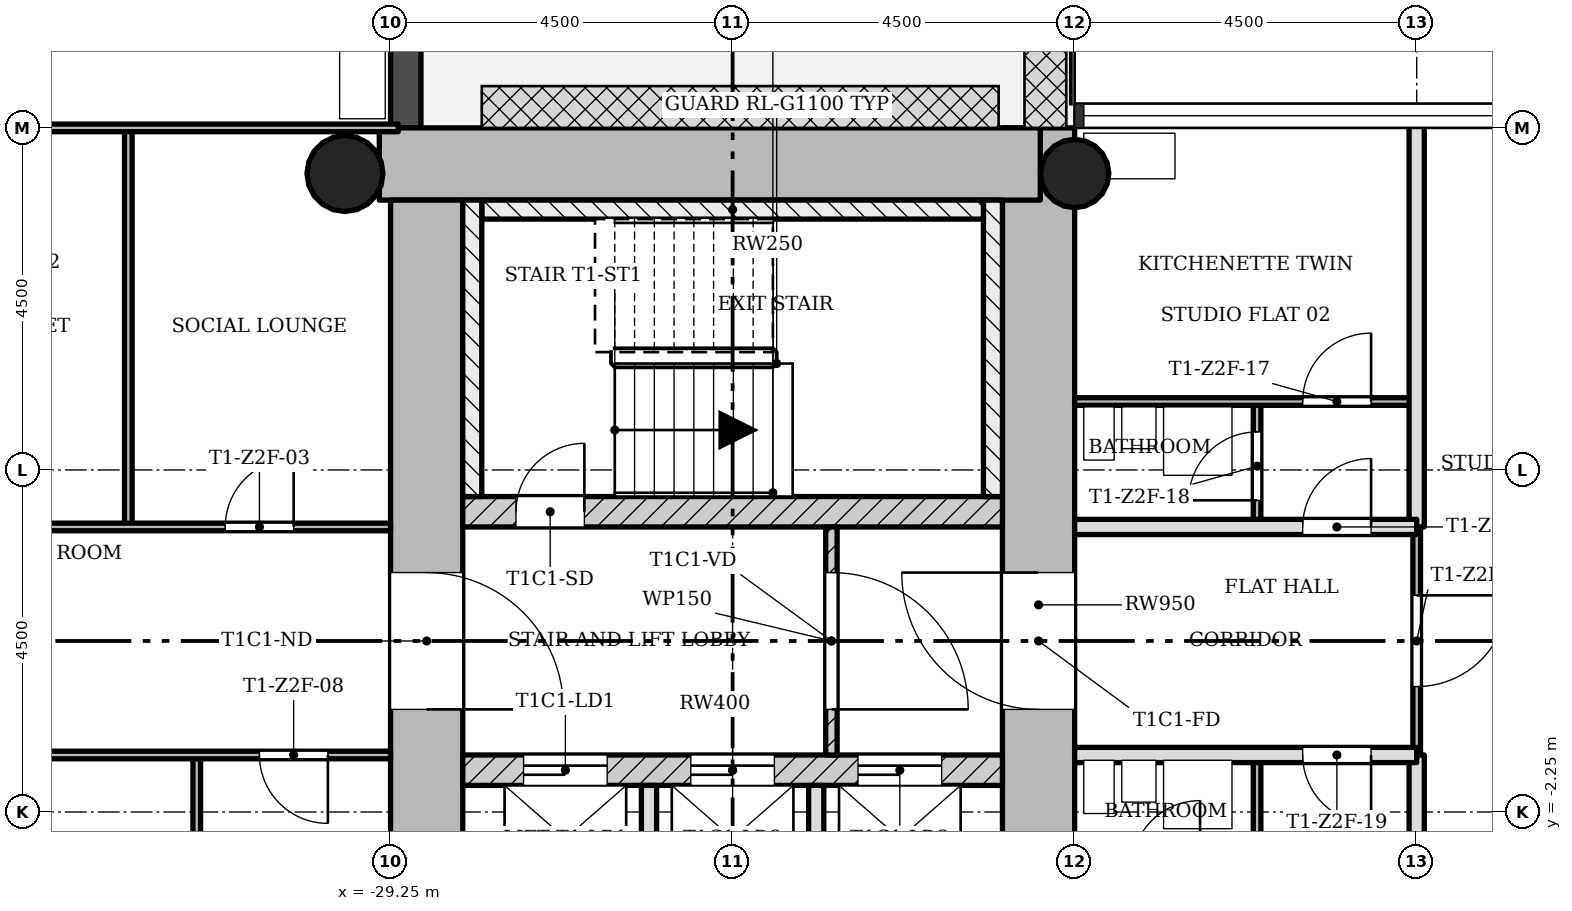
"""IFC4 building model, lengths in metres.
Left out: names, types, materials, properties, quantities, classifications, styles, units other than length and angle.
Written with IfcOpenShell. Run it as: python <this file> out.ifc"""

import sys

from ifc_helpers import new_model, si_unit, direction, frame, frame_2d, origin, origin_2d, place, context, subcontext, project, spatial, rectangle, hollow_circle, extrude, element, fill, save


model = new_model("IFC4")
c1 = context("Model", 3, precision=1e-05, world=origin(), true_north=direction((0.0, 1.0)))
c2 = subcontext(c1, "Body", "Model", "MODEL_VIEW")
j1 = project(units=[si_unit("LENGTHUNIT", "METRE"), si_unit("PLANEANGLEUNIT", "RADIAN")], contexts=[c1])
p1 = place(None, origin())
s1 = spatial("IfcSite", under=j1, at=p1, CompositionType="ELEMENT")
p2 = place(p1, origin())
s2 = spatial("IfcBuilding", under=s1, at=p2, CompositionType="ELEMENT")
p3 = place(p2, frame((0.0, 0.0, 110.6)))
s3 = spatial("IfcBuildingStorey", under=s2, at=p3, CompositionType="ELEMENT", Elevation=110.6)
p4 = place(p3, frame((-20.725, -5.8, 0.0), z_axis=(0.0, 0.0, 1.0), x_axis=(0.0, 1.0, 0.0)))
e1 = element("IfcWall", 1, at=p4, inside=s3, PredefinedType="SHEAR", context=c2, shape_type="SweptSolid", body=[
    extrude(rectangle(XDim=12.55, YDim=0.95, at=frame_2d((6.275, 0.0))), origin(), (0.0, 0.0, 1.0), 3.4),
])
p5 = place(p4, frame((4.9, 0.0, 0.0)))
e2 = element("IfcOpeningElement", 2, at=p5, cuts=e1, PredefinedType="OPENING", context=c2, shape_type="SweptSolid", body=[
    extrude(rectangle(XDim=1.8, YDim=2.1, at=frame_2d((0.9, 1.05))), frame((0.0, 0.485, 0.0), z_axis=(0.0, -1.0, 0.0), x_axis=(1.0, 0.0, 0.0)), (0.0, 0.0, 1.0), 0.97),
])
p6 = place(p3, frame((-20.702, 6.275, 0.0), z_axis=(0.0, 0.0, 1.0), x_axis=(-1.0, 0.0, 0.0)))
e3 = element("IfcWall", 3, at=p6, inside=s3, PredefinedType="SHEAR", context=c2, shape_type="SweptSolid", body=[
    extrude(rectangle(XDim=8.696, YDim=0.95, at=frame_2d((4.348, 0.0))), origin(), (0.0, 0.0, 1.0), 3.4),
])
p7 = place(p3, frame((-28.775, 5.8, 0.0), z_axis=(0.0, 0.0, 1.0), x_axis=(0.0, -1.0, 0.0)))
e4 = element("IfcWall", 4, at=p7, inside=s3, PredefinedType="SHEAR", context=c2, shape_type="SweptSolid", body=[
    extrude(rectangle(XDim=12.55, YDim=0.95, at=frame_2d((6.275, 0.0))), origin(), (0.0, 0.0, 1.0), 3.4),
])
p8 = place(p7, frame((4.9, 0.0, 0.0)))
e5 = element("IfcOpeningElement", 5, at=p8, cuts=e4, PredefinedType="OPENING", context=c2, shape_type="SweptSolid", body=[
    extrude(rectangle(XDim=1.8, YDim=2.1, at=frame_2d((0.9, 1.05))), frame((0.0, 0.485, 0.0), z_axis=(0.0, -1.0, 0.0), x_axis=(1.0, 0.0, 0.0)), (0.0, 0.0, 1.0), 0.97),
])
p9 = place(p3, frame((-28.3, -1.7, 0.0), z_axis=(0.0, 0.0, 1.0), x_axis=(1.0, 0.0, 0.0)))
e6 = element("IfcWall", 6, at=p9, inside=s3, PredefinedType="SHEAR", context=c2, shape_type="SweptSolid", body=[
    extrude(rectangle(XDim=7.1, YDim=0.4, at=frame_2d((3.55, 0.0))), origin(), (0.0, 0.0, 1.0), 3.4),
])
p10 = place(p9, frame((0.8, 0.0, 0.0)))
e7 = element("IfcOpeningElement", 7, at=p10, cuts=e6, PredefinedType="OPENING", context=c2, shape_type="SweptSolid", body=[
    extrude(rectangle(XDim=1.1, YDim=2.1, at=frame_2d((0.55, 1.05))), frame((0.0, 0.21, 0.0), z_axis=(0.0, -1.0, 0.0), x_axis=(1.0, 0.0, 0.0)), (0.0, 0.0, 1.0), 0.42),
])
p11 = place(p9, frame((3.0, 0.0, 0.0)))
e8 = element("IfcOpeningElement", 8, at=p11, cuts=e6, PredefinedType="OPENING", context=c2, shape_type="SweptSolid", body=[
    extrude(rectangle(XDim=1.1, YDim=2.1, at=frame_2d((0.55, 1.05))), frame((0.0, 0.21, 0.0), z_axis=(0.0, -1.0, 0.0), x_axis=(1.0, 0.0, 0.0)), (0.0, 0.0, 1.0), 0.42),
])
p12 = place(p9, frame((5.2, 0.0, 0.0)))
e9 = element("IfcOpeningElement", 9, at=p12, cuts=e6, PredefinedType="OPENING", context=c2, shape_type="SweptSolid", body=[
    extrude(rectangle(XDim=1.1, YDim=2.1, at=frame_2d((0.55, 1.05))), frame((0.0, 0.21, 0.0), z_axis=(0.0, -1.0, 0.0), x_axis=(1.0, 0.0, 0.0)), (0.0, 0.0, 1.0), 0.42),
])
p13 = place(p3, frame((-28.3, 1.7, 0.0), z_axis=(0.0, 0.0, 1.0), x_axis=(1.0, 0.0, 0.0)))
e10 = element("IfcWall", 10, at=p13, inside=s3, PredefinedType="SHEAR", context=c2, shape_type="SweptSolid", body=[
    extrude(rectangle(XDim=7.1, YDim=0.4, at=frame_2d((3.55, 0.0))), origin(), (0.0, 0.0, 1.0), 3.4),
])
p14 = place(p13, frame((0.7, 0.0, 0.0)))
e11 = element("IfcOpeningElement", 11, at=p14, cuts=e10, PredefinedType="OPENING", context=c2, shape_type="SweptSolid", body=[
    extrude(rectangle(XDim=0.9, YDim=2.1, at=frame_2d((0.45, 1.05))), frame((0.0, 0.21, 0.0), z_axis=(0.0, -1.0, 0.0), x_axis=(1.0, 0.0, 0.0)), (0.0, 0.0, 1.0), 0.42),
])
p15 = place(p3, frame((-20.25, 6.15, 0.0), z_axis=(0.0, 0.0, 1.0), x_axis=(1.0, 0.0, 0.0)))
e12 = element("IfcColumn", 12, at=p15, inside=s3, PredefinedType="COLUMN", context=c2, shape_type="SweptSolid", body=[
    extrude(hollow_circle(Radius=0.45, WallThickness=0.032, at=origin_2d()), origin(), (0.0, 0.0, 1.0), 3.4),
])
p16 = place(p3, frame((-29.85, 6.15, 0.0), z_axis=(0.0, 0.0, 1.0), x_axis=(1.0, 0.0, 0.0)))
e13 = element("IfcColumn", 13, at=p16, inside=s3, PredefinedType="COLUMN", context=c2, shape_type="SweptSolid", body=[
    extrude(hollow_circle(Radius=0.5, WallThickness=0.036, at=origin_2d()), origin(), (0.0, 0.0, 1.0), 3.4),
])
p17 = place(p3, frame((-29.05, 6.75, -0.02), z_axis=(0.0, 0.0, 1.0), x_axis=(0.0, 1.0, 0.0)))
e14 = element("IfcWall", 14, at=p17, inside=s3, PredefinedType="STANDARD", context=c2, shape_type="SweptSolid", body=[
    extrude(rectangle(XDim=4.5, YDim=0.4, at=frame_2d((2.25, 0.0))), origin(), (0.0, 0.0, 1.0), 3.12),
])
p18 = place(p17, frame((1.35, 0.0, 0.02)))
e15 = element("IfcOpeningElement", 15, at=p18, cuts=e14, PredefinedType="OPENING", context=c2, shape_type="SweptSolid", body=[
    extrude(rectangle(XDim=1.8, YDim=2.1, at=frame_2d((0.9, 1.05))), frame((0.0, 0.21, 0.0), z_axis=(0.0, -1.0, 0.0), x_axis=(1.0, 0.0, 0.0)), (0.0, 0.0, 1.0), 0.42),
])
p19 = place(p3, frame((-23.45, -1.5, 0.0), z_axis=(0.0, 0.0, 1.0), x_axis=(0.0, 1.0, 0.0)))
e16 = element("IfcWall", 16, at=p19, inside=s3, PredefinedType="PARTITIONING", context=c2, shape_type="SweptSolid", body=[
    extrude(rectangle(XDim=3.0, YDim=0.15, at=frame_2d((1.5, 0.0))), origin(), (0.0, 0.0, 1.0), 3.0),
])
p20 = place(p19, frame((0.6, 0.0, 0.0)))
e17 = element("IfcOpeningElement", 17, at=p20, cuts=e16, PredefinedType="OPENING", context=c2, shape_type="SweptSolid", body=[
    extrude(rectangle(XDim=1.8, YDim=2.1, at=frame_2d((0.9, 1.05))), frame((0.0, 0.085, 0.0), z_axis=(0.0, -1.0, 0.0), x_axis=(1.0, 0.0, 0.0)), (0.0, 0.0, 1.0), 0.17),
])
for number, where, z_axis, x_axis in (
    (18, (-25.85, -5.8, 0.0), (0.0, 0.0, 1.0), (0.0, 1.0, 0.0)),
    (19, (-23.65, -5.8, 0.0), (0.0, 0.0, 1.0), (0.0, 1.0, 0.0)),
):
    element("IfcWall", number, at=place(p3, frame(where, z_axis=z_axis, x_axis=x_axis)), inside=s3, PredefinedType="SOLIDWALL", context=c2, shape_type="SweptSolid", body=[
        extrude(rectangle(XDim=3.9, YDim=0.2, at=frame_2d((1.95, 0.0))), origin(), (0.0, 0.0, 1.0), 3.0),
    ])
for number, where, z_axis, x_axis in (
    (20, (-32.7, 1.5, 0.0), (0.0, 0.0, 1.0), (0.0, 1.0, 0.0)),
    (21, (-31.8, -6.75, 0.0), (0.0, 0.0, 1.0), (0.0, 1.0, 0.0)),
):
    element("IfcWall", number, at=place(p3, frame(where, z_axis=z_axis, x_axis=x_axis)), inside=s3, PredefinedType="PARTITIONING", context=c2, shape_type="SweptSolid", body=[
        extrude(rectangle(XDim=5.25, YDim=0.1, at=frame_2d((2.625, 0.0))), origin(), (0.0, 0.0, 1.0), 3.0),
    ])
p21 = place(p3, frame((-17.85, -3.0, 0.0), z_axis=(0.0, 0.0, 1.0), x_axis=(0.0, 1.0, 0.0)))
e22 = element("IfcWall", 22, at=p21, inside=s3, PredefinedType="PARTITIONING", context=c2, shape_type="SweptSolid", body=[
    extrude(rectangle(XDim=1.5, YDim=0.1, at=frame_2d((0.75, 0.0))), origin(), (0.0, 0.0, 1.0), 3.0),
])
p22 = place(p3, frame((-17.85, 1.5, 0.0), z_axis=(0.0, 0.0, 1.0), x_axis=(0.0, 1.0, 0.0)))
e23 = element("IfcWall", 23, at=p22, inside=s3, PredefinedType="PARTITIONING", context=c2, shape_type="SweptSolid", body=[
    extrude(rectangle(XDim=1.65, YDim=0.1, at=frame_2d((0.825, 0.0))), origin(), (0.0, 0.0, 1.0), 3.0),
])
p23 = place(p22, frame((0.35, 0.0, 0.0)))
e24 = element("IfcOpeningElement", 24, at=p23, cuts=e23, PredefinedType="OPENING", context=c2, shape_type="SweptSolid", body=[
    extrude(rectangle(XDim=0.9, YDim=2.1, at=frame_2d((0.45, 1.05))), frame((0.0, 0.06, 0.0), z_axis=(0.0, -1.0, 0.0), x_axis=(1.0, 0.0, 0.0)), (0.0, 0.0, 1.0), 0.12),
])
p24 = place(p3, frame((-15.75, -1.5, 0.0), z_axis=(0.0, 0.0, 1.0), x_axis=(0.0, 1.0, 0.0)))
e25 = element("IfcWall", 25, at=p24, inside=s3, PredefinedType="PARTITIONING", context=c2, shape_type="SweptSolid", body=[
    extrude(rectangle(XDim=3.0, YDim=0.1, at=frame_2d((1.5, 0.0))), origin(), (0.0, 0.0, 1.0), 3.0),
])
p25 = place(p24, frame((0.9, 0.0, 0.0)))
e26 = element("IfcOpeningElement", 26, at=p25, cuts=e25, PredefinedType="OPENING", context=c2, shape_type="SweptSolid", body=[
    extrude(rectangle(XDim=1.2, YDim=2.1, at=frame_2d((0.6, 1.05))), frame((0.0, 0.06, 0.0), z_axis=(0.0, -1.0, 0.0), x_axis=(1.0, 0.0, 0.0)), (0.0, 0.0, 1.0), 0.12),
])
for number, where, z_axis, x_axis in (
    (27, (-15.75, -6.85, 0.0), (0.0, 0.0, 1.0), (0.0, 1.0, 0.0)),
    (28, (-15.75, 1.5, 0.0), (0.0, 0.0, 1.0), (0.0, 1.0, 0.0)),
):
    element("IfcWall", number, at=place(p3, frame(where, z_axis=z_axis, x_axis=x_axis)), inside=s3, PredefinedType="SOLIDWALL", context=c2, shape_type="SweptSolid", body=[
        extrude(rectangle(XDim=5.35, YDim=0.2, at=frame_2d((2.675, 0.0))), origin(), (0.0, 0.0, 1.0), 3.0),
    ])
p26 = place(p3, frame((-35.1, -1.5, 0.0), z_axis=(0.0, 0.0, 1.0), x_axis=(1.0, 0.0, 0.0)))
e29 = element("IfcWall", 29, at=p26, inside=s3, PredefinedType="PARTITIONING", context=c2, shape_type="SweptSolid", body=[
    extrude(rectangle(XDim=5.85, YDim=0.1, at=frame_2d((2.925, 0.0))), origin(), (0.0, 0.0, 1.0), 3.0),
])
p27 = place(p26, frame((4.125, 0.0, 0.0)))
e30 = element("IfcOpeningElement", 30, at=p27, cuts=e29, PredefinedType="OPENING", context=c2, shape_type="SweptSolid", body=[
    extrude(rectangle(XDim=0.9, YDim=2.1, at=frame_2d((0.45, 1.05))), frame((0.0, 0.06, 0.0), z_axis=(0.0, -1.0, 0.0), x_axis=(1.0, 0.0, 0.0)), (0.0, 0.0, 1.0), 0.12),
])
p28 = place(p3, frame((-20.25, -1.5, 0.0), z_axis=(0.0, 0.0, 1.0), x_axis=(1.0, 0.0, 0.0)))
e31 = element("IfcWall", 31, at=p28, inside=s3, PredefinedType="SOLIDWALL", context=c2, shape_type="SweptSolid", body=[
    extrude(rectangle(XDim=4.5, YDim=0.2, at=frame_2d((2.25, 0.0))), origin(), (0.0, 0.0, 1.0), 3.0),
])
p29 = place(p28, frame((3.0, 0.0, 0.0)))
e32 = element("IfcOpeningElement", 32, at=p29, cuts=e31, PredefinedType="OPENING", context=c2, shape_type="SweptSolid", body=[
    extrude(rectangle(XDim=0.9, YDim=2.1, at=frame_2d((0.45, 1.05))), frame((0.0, 0.11, 0.0), z_axis=(0.0, -1.0, 0.0), x_axis=(1.0, 0.0, 0.0)), (0.0, 0.0, 1.0), 0.22),
])
p30 = place(p3, frame((-35.1, 1.5, 0.0), z_axis=(0.0, 0.0, 1.0), x_axis=(1.0, 0.0, 0.0)))
e33 = element("IfcWall", 33, at=p30, inside=s3, PredefinedType="PARTITIONING", context=c2, shape_type="SweptSolid", body=[
    extrude(rectangle(XDim=5.85, YDim=0.1, at=frame_2d((2.925, 0.0))), origin(), (0.0, 0.0, 1.0), 3.0),
])
p31 = place(p30, frame((3.675, 0.0, 0.0)))
e34 = element("IfcOpeningElement", 34, at=p31, cuts=e33, PredefinedType="OPENING", context=c2, shape_type="SweptSolid", body=[
    extrude(rectangle(XDim=0.9, YDim=2.1, at=frame_2d((0.45, 1.05))), frame((0.0, 0.06, 0.0), z_axis=(0.0, -1.0, 0.0), x_axis=(1.0, 0.0, 0.0)), (0.0, 0.0, 1.0), 0.12),
])
p32 = place(p3, frame((-20.25, 1.5, 0.0), z_axis=(0.0, 0.0, 1.0), x_axis=(1.0, 0.0, 0.0)))
e35 = element("IfcWall", 35, at=p32, inside=s3, PredefinedType="SOLIDWALL", context=c2, shape_type="SweptSolid", body=[
    extrude(rectangle(XDim=4.5, YDim=0.2, at=frame_2d((2.25, 0.0))), origin(), (0.0, 0.0, 1.0), 3.0),
])
p33 = place(p32, frame((3.0, 0.0, 0.0)))
e36 = element("IfcOpeningElement", 36, at=p33, cuts=e35, PredefinedType="OPENING", context=c2, shape_type="SweptSolid", body=[
    extrude(rectangle(XDim=0.9, YDim=2.1, at=frame_2d((0.45, 1.05))), frame((0.0, 0.11, 0.0), z_axis=(0.0, -1.0, 0.0), x_axis=(1.0, 0.0, 0.0)), (0.0, 0.0, 1.0), 0.22),
])
p34 = place(p3, frame((-20.25, 3.15, 0.0), z_axis=(0.0, 0.0, 1.0), x_axis=(1.0, 0.0, 0.0)))
e37 = element("IfcWall", 37, at=p34, inside=s3, PredefinedType="PARTITIONING", context=c2, shape_type="SweptSolid", body=[
    extrude(rectangle(XDim=4.5, YDim=0.1, at=frame_2d((2.25, 0.0))), origin(), (0.0, 0.0, 1.0), 3.0),
])
p35 = place(p34, frame((3.0, 0.0, 0.0)))
e38 = element("IfcOpeningElement", 38, at=p35, cuts=e37, PredefinedType="OPENING", context=c2, shape_type="SweptSolid", body=[
    extrude(rectangle(XDim=0.9, YDim=2.1, at=frame_2d((0.45, 1.05))), frame((0.0, 0.06, 0.0), z_axis=(0.0, -1.0, 0.0), x_axis=(1.0, 0.0, 0.0)), (0.0, 0.0, 1.0), 0.12),
])
p36 = place(p3, frame((-35.1, 6.75, 0.0), z_axis=(0.0, 0.0, 1.0), x_axis=(1.0, 0.0, 0.0)))
e39 = element("IfcWall", 39, at=p36, inside=s3, PredefinedType="PARTITIONING", context=c2, shape_type="SweptSolid", body=[
    extrude(rectangle(XDim=5.95, YDim=0.1, at=frame_2d((2.975, 0.0))), origin(), (0.0, 0.0, 1.0), 3.0),
])
p37 = place(p3, frame((-21.325, 1.9, 0.0), z_axis=(0.0, 0.0, 1.0), x_axis=(0.0, 1.0, 0.0)))
e40 = element("IfcWall", 40, at=p37, inside=s3, PredefinedType="SHEAR", context=c2, shape_type="SweptSolid", body=[
    extrude(rectangle(XDim=3.9, YDim=0.25, at=frame_2d((1.95, 0.0))), origin(), (0.0, 0.0, 1.0), 3.4),
])
p38 = place(p3, frame((-28.05, 5.675, 0.0), z_axis=(0.0, 0.0, 1.0), x_axis=(1.0, 0.0, 0.0)))
e41 = element("IfcWall", 41, at=p38, inside=s3, PredefinedType="SHEAR", context=c2, shape_type="SweptSolid", body=[
    extrude(rectangle(XDim=6.6, YDim=0.25, at=frame_2d((3.3, 0.0))), origin(), (0.0, 0.0, 1.0), 3.4),
])
p39 = place(p3, frame((-28.175, 1.9, 0.0), z_axis=(0.0, 0.0, 1.0), x_axis=(0.0, 1.0, 0.0)))
e42 = element("IfcWall", 42, at=p39, inside=s3, PredefinedType="SHEAR", context=c2, shape_type="SweptSolid", body=[
    extrude(rectangle(XDim=3.9, YDim=0.25, at=frame_2d((1.95, 0.0))), origin(), (0.0, 0.0, 1.0), 3.4),
])
p40 = place(p20, origin())
e43 = element("IfcDoor", 43, at=p40, inside=s3, OperationType="SINGLE_SWING_LEFT", PredefinedType="DOOR", context=c2, shape_type="SweptSolid", body=[
    extrude(rectangle(XDim=1.8, YDim=2.1, at=frame_2d((0.9, 1.05))), frame((0.0, 0.025, 0.0), z_axis=(0.0, -1.0, 0.0), x_axis=(1.0, 0.0, 0.0)), (0.0, 0.0, 1.0), 0.05),
])
fill(e17, e43)
p41 = place(p31, origin())
e44 = element("IfcDoor", 44, at=p41, inside=s3, OperationType="SINGLE_SWING_LEFT", PredefinedType="DOOR", context=c2, shape_type="SweptSolid", body=[
    extrude(rectangle(XDim=0.9, YDim=2.1, at=frame_2d((0.45, 1.05))), frame((0.0, 0.025, 0.0), z_axis=(0.0, -1.0, 0.0), x_axis=(1.0, 0.0, 0.0)), (0.0, 0.0, 1.0), 0.05),
])
fill(e34, e44)
p42 = place(p27, origin())
e45 = element("IfcDoor", 45, at=p42, inside=s3, OperationType="SINGLE_SWING_RIGHT", PredefinedType="DOOR", context=c2, shape_type="SweptSolid", body=[
    extrude(rectangle(XDim=0.9, YDim=2.1, at=frame_2d((0.45, 1.05))), frame((0.0, 0.025, 0.0), z_axis=(0.0, -1.0, 0.0), x_axis=(1.0, 0.0, 0.0)), (0.0, 0.0, 1.0), 0.05),
])
fill(e30, e45)
p43 = place(p33, origin())
e46 = element("IfcDoor", 46, at=p43, inside=s3, OperationType="SINGLE_SWING_LEFT", PredefinedType="DOOR", context=c2, shape_type="SweptSolid", body=[
    extrude(rectangle(XDim=0.9, YDim=2.1, at=frame_2d((0.45, 1.05))), frame((0.0, 0.025, 0.0), z_axis=(0.0, -1.0, 0.0), x_axis=(1.0, 0.0, 0.0)), (0.0, 0.0, 1.0), 0.05),
])
fill(e36, e46)
p44 = place(p35, origin())
e47 = element("IfcDoor", 47, at=p44, inside=s3, OperationType="SINGLE_SWING_LEFT", PredefinedType="DOOR", context=c2, shape_type="SweptSolid", body=[
    extrude(rectangle(XDim=0.9, YDim=2.1, at=frame_2d((0.45, 1.05))), frame((0.0, 0.025, 0.0), z_axis=(0.0, -1.0, 0.0), x_axis=(1.0, 0.0, 0.0)), (0.0, 0.0, 1.0), 0.05),
])
fill(e38, e47)
p45 = place(p23, origin())
e48 = element("IfcDoor", 48, at=p45, inside=s3, OperationType="SINGLE_SWING_RIGHT", PredefinedType="DOOR", context=c2, shape_type="SweptSolid", body=[
    extrude(rectangle(XDim=0.9, YDim=2.1, at=frame_2d((0.45, 1.05))), frame((0.0, 0.025, 0.0), z_axis=(0.0, -1.0, 0.0), x_axis=(1.0, 0.0, 0.0)), (0.0, 0.0, 1.0), 0.05),
])
fill(e24, e48)
p46 = place(p29, origin())
e49 = element("IfcDoor", 49, at=p46, inside=s3, OperationType="SINGLE_SWING_RIGHT", PredefinedType="DOOR", context=c2, shape_type="SweptSolid", body=[
    extrude(rectangle(XDim=0.9, YDim=2.1, at=frame_2d((0.45, 1.05))), frame((0.0, 0.025, 0.0), z_axis=(0.0, -1.0, 0.0), x_axis=(1.0, 0.0, 0.0)), (0.0, 0.0, 1.0), 0.05),
])
fill(e32, e49)
p47 = place(p25, origin())
e50 = element("IfcDoor", 50, at=p47, inside=s3, OperationType="SINGLE_SWING_RIGHT", PredefinedType="DOOR", context=c2, shape_type="SweptSolid", body=[
    extrude(rectangle(XDim=1.2, YDim=2.1, at=frame_2d((0.6, 1.05))), frame((0.0, 0.025, 0.0), z_axis=(0.0, -1.0, 0.0), x_axis=(1.0, 0.0, 0.0)), (0.0, 0.0, 1.0), 0.05),
])
fill(e26, e50)
p48 = place(p14, origin())
e51 = element("IfcDoor", 51, at=p48, inside=s3, OperationType="SINGLE_SWING_LEFT", PredefinedType="DOOR", context=c2, shape_type="SweptSolid", body=[
    extrude(rectangle(XDim=0.9, YDim=2.1, at=frame_2d((0.45, 1.05))), frame((0.0, 0.025, 0.0), z_axis=(0.0, -1.0, 0.0), x_axis=(1.0, 0.0, 0.0)), (0.0, 0.0, 1.0), 0.05),
])
fill(e11, e51)
p49 = place(p10, origin())
e52 = element("IfcDoor", 52, at=p49, inside=s3, OperationType="SLIDING_TO_LEFT", PredefinedType="DOOR", context=c2, shape_type="SweptSolid", body=[
    extrude(rectangle(XDim=1.1, YDim=2.1, at=frame_2d((0.55, 1.05))), frame((0.0, 0.025, 0.0), z_axis=(0.0, -1.0, 0.0), x_axis=(1.0, 0.0, 0.0)), (0.0, 0.0, 1.0), 0.05),
])
fill(e7, e52)
p50 = place(p11, origin())
e53 = element("IfcDoor", 53, at=p50, inside=s3, OperationType="SLIDING_TO_LEFT", PredefinedType="DOOR", context=c2, shape_type="SweptSolid", body=[
    extrude(rectangle(XDim=1.1, YDim=2.1, at=frame_2d((0.55, 1.05))), frame((0.0, 0.025, 0.0), z_axis=(0.0, -1.0, 0.0), x_axis=(1.0, 0.0, 0.0)), (0.0, 0.0, 1.0), 0.05),
])
fill(e8, e53)
p51 = place(p12, origin())
e54 = element("IfcDoor", 54, at=p51, inside=s3, OperationType="SLIDING_TO_LEFT", PredefinedType="DOOR", context=c2, shape_type="SweptSolid", body=[
    extrude(rectangle(XDim=1.1, YDim=2.1, at=frame_2d((0.55, 1.05))), frame((0.0, 0.025, 0.0), z_axis=(0.0, -1.0, 0.0), x_axis=(1.0, 0.0, 0.0)), (0.0, 0.0, 1.0), 0.05),
])
fill(e9, e54)
p52 = place(p8, origin())
e55 = element("IfcDoor", 55, at=p52, inside=s3, OperationType="SINGLE_SWING_LEFT", PredefinedType="DOOR", context=c2, shape_type="SweptSolid", body=[
    extrude(rectangle(XDim=1.8, YDim=2.1, at=frame_2d((0.9, 1.05))), frame((0.0, 0.025, 0.0), z_axis=(0.0, -1.0, 0.0), x_axis=(1.0, 0.0, 0.0)), (0.0, 0.0, 1.0), 0.05),
])
fill(e5, e55)
p53 = place(p5, origin())
e56 = element("IfcDoor", 56, at=p53, inside=s3, OperationType="SINGLE_SWING_LEFT", PredefinedType="DOOR", context=c2, shape_type="SweptSolid", body=[
    extrude(rectangle(XDim=1.8, YDim=2.1, at=frame_2d((0.9, 1.05))), frame((0.0, 0.025, 0.0), z_axis=(0.0, -1.0, 0.0), x_axis=(1.0, 0.0, 0.0)), (0.0, 0.0, 1.0), 0.05),
])
fill(e2, e56)
save(model, sys.argv[1])
